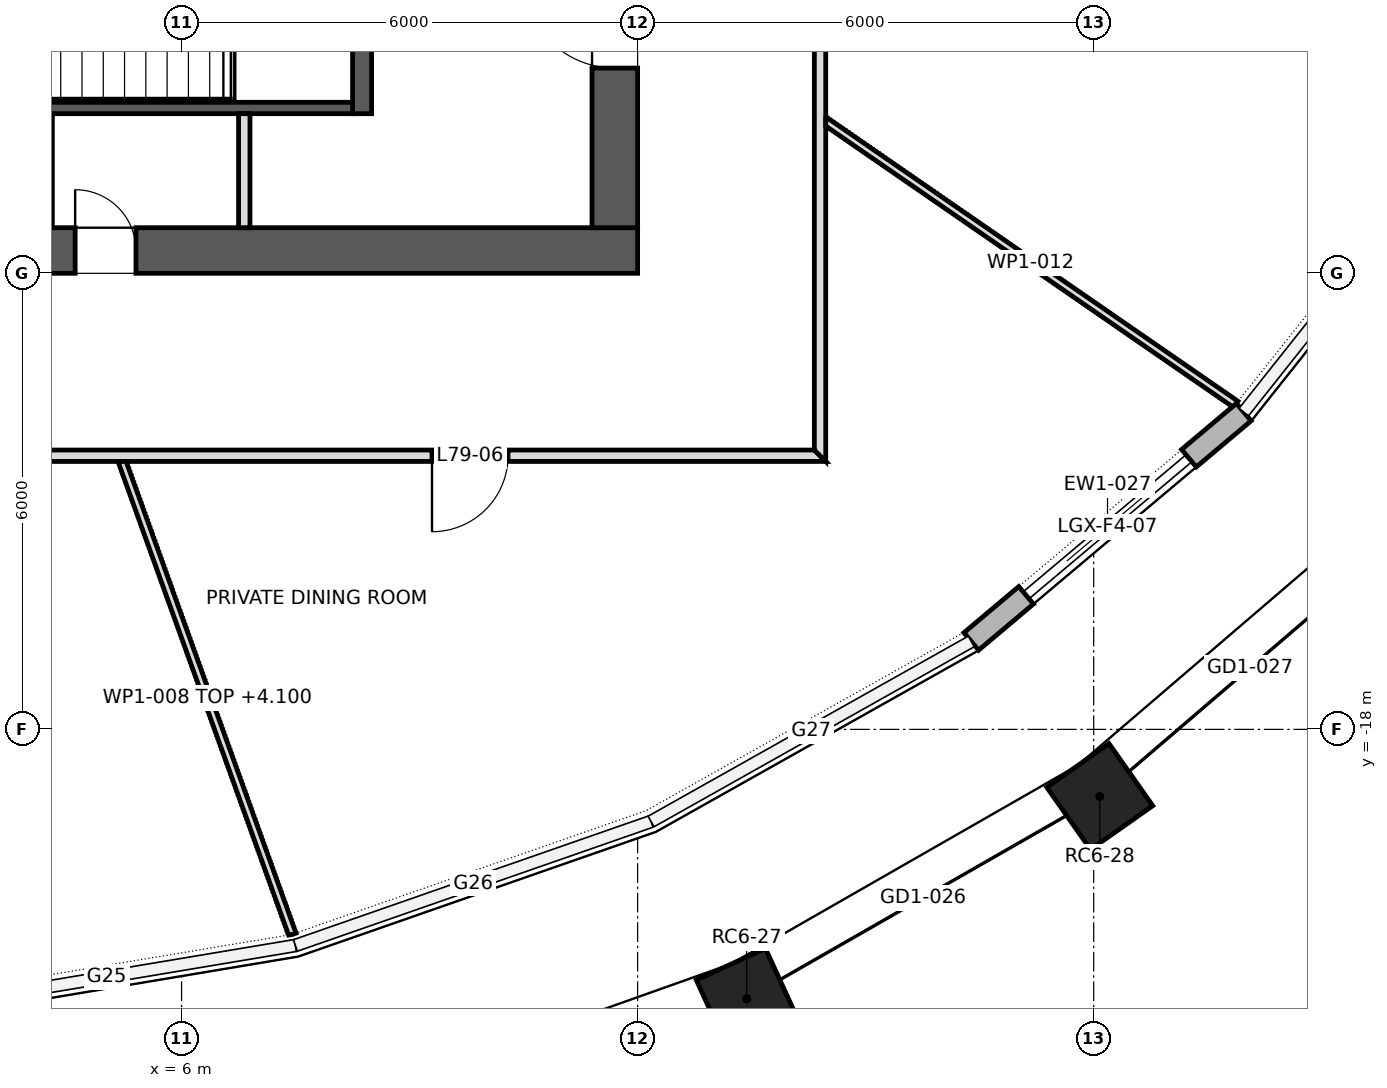
"""IFC4 building model, lengths in metres.
Left out: names, types, materials, properties, quantities, classifications, styles, units other than length and angle.
Written with IfcOpenShell. Run it as: python <this file> out.ifc"""

import sys

from ifc_helpers import new_model, si_unit, direction, frame, frame_2d, origin, origin_2d, place, context, subcontext, project, spatial, polyline, rectangle, outline, extrude, element, fill, save


model = new_model("IFC4")
c1 = context("Model", 3, precision=1e-05, world=origin(), true_north=direction((0.0, 1.0)))
c2 = subcontext(c1, "Body", "Model", "MODEL_VIEW")
j1 = project(units=[si_unit("LENGTHUNIT", "METRE"), si_unit("PLANEANGLEUNIT", "RADIAN")], contexts=[c1])
p1 = place(None, origin())
s1 = spatial("IfcSite", under=j1, at=p1, CompositionType="ELEMENT")
p2 = place(p1, origin())
s2 = spatial("IfcBuilding", under=s1, at=p2, CompositionType="ELEMENT")
p3 = place(p2, frame((0.0, 0.0, 338.3)))
s3 = spatial("IfcBuildingStorey", under=s2, at=p3, CompositionType="ELEMENT", Elevation=338.3)
for number, where, z_axis, x_axis in (
    (1, (13.435, -21.544, 0.0), (0.0, 0.0, 1.0), (0.909, 0.417, 0.0)),
    (2, (18.08, -18.884, 0.0), (0.0, 0.0, 1.0), (0.818, 0.575, 0.0)),
):
    element("IfcColumn", number, at=place(p3, frame(where, z_axis=z_axis, x_axis=x_axis)), inside=s3, PredefinedType="COLUMN", context=c2, shape_type="SweptSolid", body=[
        extrude(rectangle(XDim=1.0, YDim=1.0, at=origin_2d()), origin(), (0.0, 0.0, 1.0), 5.0),
    ])
p4 = place(p3, frame((-12.0, -11.7, 0.0), z_axis=(0.0, 0.0, 1.0), x_axis=(1.0, 0.0, 0.0)))
e3 = element("IfcWall", 3, at=p4, inside=s3, PredefinedType="SHEAR", context=c2, shape_type="SweptSolid", body=[
    extrude(rectangle(XDim=24.0, YDim=0.6, at=frame_2d((12.0, 0.0))), origin(), (0.0, 0.0, 1.0), 5.0),
])
p5 = place(p4, frame((9.975, 0.0, 0.0)))
e4 = element("IfcOpeningElement", 4, at=p5, cuts=e3, PredefinedType="OPENING", context=c2, shape_type="SweptSolid", body=[
    extrude(rectangle(XDim=0.9, YDim=2.1, at=frame_2d((0.45, 1.05))), frame((0.0, 0.312, 0.0), z_axis=(0.0, -1.0, 0.0), x_axis=(1.0, 0.0, 0.0)), (0.0, 0.0, 1.0), 0.624),
])
p6 = place(p4, frame((4.2, 0.0, 0.0)))
e5 = element("IfcOpeningElement", 5, at=p6, cuts=e3, PredefinedType="OPENING", context=c2, shape_type="SweptSolid", body=[
    extrude(rectangle(XDim=0.8, YDim=2.1, at=frame_2d((0.4, 1.05))), frame((0.0, 0.312, 0.0), z_axis=(0.0, -1.0, 0.0), x_axis=(1.0, 0.0, 0.0)), (0.0, 0.0, 1.0), 0.624),
])
p7 = place(p4, frame((13.8, 0.0, 0.0)))
e6 = element("IfcOpeningElement", 6, at=p7, cuts=e3, PredefinedType="OPENING", context=c2, shape_type="SweptSolid", body=[
    extrude(rectangle(XDim=0.8, YDim=2.1, at=frame_2d((0.4, 1.05))), frame((0.0, 0.312, 0.0), z_axis=(0.0, -1.0, 0.0), x_axis=(1.0, 0.0, 0.0)), (0.0, 0.0, 1.0), 0.624),
])
p8 = place(p4, frame((16.6, 0.0, 0.0)))
e7 = element("IfcOpeningElement", 7, at=p8, cuts=e3, PredefinedType="OPENING", context=c2, shape_type="SweptSolid", body=[
    extrude(rectangle(XDim=0.8, YDim=2.1, at=frame_2d((0.4, 1.05))), frame((0.0, 0.312, 0.0), z_axis=(0.0, -1.0, 0.0), x_axis=(1.0, 0.0, 0.0)), (0.0, 0.0, 1.0), 0.624),
])
p9 = place(p3, frame((11.7, -11.4, 0.0), z_axis=(0.0, 0.0, 1.0), x_axis=(0.0, 1.0, 0.0)))
e8 = element("IfcWall", 8, at=p9, inside=s3, PredefinedType="SHEAR", context=c2, shape_type="SweptSolid", body=[
    extrude(rectangle(XDim=22.8, YDim=0.6, at=frame_2d((11.4, 0.0))), origin(), (0.0, 0.0, 1.0), 5.0),
])
p10 = place(p9, frame((10.2, 0.0, 0.0)))
e9 = element("IfcOpeningElement", 9, at=p10, cuts=e8, PredefinedType="OPENING", context=c2, shape_type="SweptSolid", body=[
    extrude(rectangle(XDim=2.4, YDim=2.1, at=frame_2d((1.2, 1.05))), frame((0.0, 0.312, 0.0), z_axis=(0.0, -1.0, 0.0), x_axis=(1.0, 0.0, 0.0)), (0.0, 0.0, 1.0), 0.624),
])
p11 = place(p9, frame((19.5, 0.0, 0.0)))
e10 = element("IfcOpeningElement", 10, at=p11, cuts=e8, PredefinedType="OPENING", context=c2, shape_type="SweptSolid", body=[
    extrude(rectangle(XDim=1.2, YDim=2.1, at=frame_2d((0.6, 1.05))), frame((0.0, 0.312, 0.0), z_axis=(0.0, -1.0, 0.0), x_axis=(1.0, 0.0, 0.0)), (0.0, 0.0, 1.0), 0.624),
])
p12 = place(p9, frame((2.1, 0.0, 0.0)))
e11 = element("IfcOpeningElement", 11, at=p12, cuts=e8, PredefinedType="OPENING", context=c2, shape_type="SweptSolid", body=[
    extrude(rectangle(XDim=1.2, YDim=2.1, at=frame_2d((0.6, 1.05))), frame((0.0, 0.312, 0.0), z_axis=(0.0, -1.0, 0.0), x_axis=(1.0, 0.0, 0.0)), (0.0, 0.0, 1.0), 0.624),
])
p13 = place(p3, frame((16.39, -16.843, 0.0), z_axis=(0.0, 0.0, 1.0), x_axis=(0.765128700347, 0.643877373344, 0.0)))
e12 = element("IfcWall", 12, at=p13, inside=s3, PredefinedType="STANDARD", context=c2, shape_type="SweptSolid", body=[
    extrude(outline(polyline([(0.0, -0.15), (4.686, -0.15), (4.686, 0.15), (0.0, 0.15), (0.0, -0.15)])), origin(), (0.0, 0.0, 1.0), 4.65),
])
p14 = place(p13, frame((0.943, 0.0, 0.0)))
e13 = element("IfcOpeningElement", 13, at=p14, cuts=e12, PredefinedType="OPENING", context=c2, shape_type="SweptSolid", body=[
    extrude(rectangle(XDim=2.8, YDim=4.2, at=frame_2d((1.4, 2.1))), frame((0.0, 0.162, 0.0), z_axis=(0.0, -1.0, 0.0), x_axis=(1.0, 0.0, 0.0)), (0.0, 0.0, 1.0), 0.324),
])
p15 = place(p3, frame((8.375, -9.9, 0.0), z_axis=(0.0, 0.0, 1.0), x_axis=(0.0, 1.0, 0.0)))
e14 = element("IfcWall", 14, at=p15, inside=s3, PredefinedType="SHEAR", context=c2, shape_type="SweptSolid", body=[
    extrude(rectangle(XDim=3.4, YDim=0.25, at=frame_2d((1.7, 0.0))), origin(), (0.0, 0.0, 1.0), 4.65),
])
p16 = place(p15, frame((1.175, 0.0, 0.0)))
e15 = element("IfcOpeningElement", 15, at=p16, cuts=e14, PredefinedType="OPENING", context=c2, shape_type="SweptSolid", body=[
    extrude(rectangle(XDim=1.2, YDim=2.1, at=frame_2d((0.6, 1.05))), frame((0.0, 0.137, 0.0), z_axis=(0.0, -1.0, 0.0), x_axis=(1.0, 0.0, 0.0)), (0.0, 0.0, 1.0), 0.274),
])
p17 = place(p3, frame((0.25, -9.825, 0.0), z_axis=(0.0, 0.0, 1.0), x_axis=(1.0, 0.0, 0.0)))
e16 = element("IfcWall", 16, at=p17, inside=s3, PredefinedType="SHEAR", context=c2, shape_type="SweptSolid", body=[
    extrude(rectangle(XDim=8.0, YDim=0.15, at=frame_2d((4.0, 0.0))), origin(), (0.0, 0.0, 1.0), 4.65),
])
p18 = place(p3, frame((6.825, -11.4, 0.0), z_axis=(0.0, 0.0, 1.0), x_axis=(0.0, 1.0, 0.0)))
e17 = element("IfcWall", 17, at=p18, inside=s3, PredefinedType="PARTITIONING", context=c2, shape_type="SweptSolid", body=[
    extrude(rectangle(XDim=1.5, YDim=0.15, at=frame_2d((0.75, 0.0))), origin(), (0.0, 0.0, 1.0), 4.65),
])
p19 = place(p3, frame((-14.475, -14.4, 0.0), z_axis=(0.0, 0.0, 1.0), x_axis=(1.0, 0.0, 0.0)))
e18 = element("IfcWall", 18, at=p19, inside=s3, PredefinedType="PARTITIONING", context=c2, shape_type="SweptSolid", body=[
    extrude(outline(polyline([(0.0, -0.075), (1.93, -0.075), (3.86, -0.075), (5.79, -0.075), (7.72, -0.075), (9.65, -0.075), (11.58, -0.075), (13.51, -0.075), (15.44, -0.075), (17.37, -0.075), (19.3, -0.075), (21.23, -0.075), (23.16, -0.075), (25.09, -0.075), (27.02, -0.075), (28.95, -0.075), (28.8, 0.075), (26.89, 0.075), (24.98, 0.075), (23.07, 0.075), (21.16, 0.075), (19.25, 0.075), (17.34, 0.075), (15.43, 0.075), (13.52, 0.075), (11.61, 0.075), (9.7, 0.075), (7.79, 0.075), (5.88, 0.075), (3.97, 0.075), (2.06, 0.075), (0.15, 0.075), (0.0, -0.075)])), origin(), (0.0, 0.0, 1.0), 4.65),
])
p20 = place(p19, frame((4.36, 0.0, 0.0)))
e19 = element("IfcOpeningElement", 19, at=p20, cuts=e18, PredefinedType="OPENING", context=c2, shape_type="SweptSolid", body=[
    extrude(rectangle(XDim=1.0, YDim=2.1, at=frame_2d((0.5, 1.05))), frame((0.0, 0.087, 0.0), z_axis=(0.0, -1.0, 0.0), x_axis=(1.0, 0.0, 0.0)), (0.0, 0.0, 1.0), 0.174),
])
p21 = place(p19, frame((13.975, 0.0, 0.0)))
e20 = element("IfcOpeningElement", 20, at=p21, cuts=e18, PredefinedType="OPENING", context=c2, shape_type="SweptSolid", body=[
    extrude(rectangle(XDim=1.0, YDim=2.1, at=frame_2d((0.5, 1.05))), frame((0.0, 0.087, 0.0), z_axis=(0.0, -1.0, 0.0), x_axis=(1.0, 0.0, 0.0)), (0.0, 0.0, 1.0), 0.174),
])
p22 = place(p19, frame((23.77, 0.0, 0.0)))
e21 = element("IfcOpeningElement", 21, at=p22, cuts=e18, PredefinedType="OPENING", context=c2, shape_type="SweptSolid", body=[
    extrude(rectangle(XDim=1.0, YDim=2.1, at=frame_2d((0.5, 1.05))), frame((0.0, 0.087, 0.0), z_axis=(0.0, -1.0, 0.0), x_axis=(1.0, 0.0, 0.0)), (0.0, 0.0, 1.0), 0.174),
])
p23 = place(p3, frame((5.211, -14.458, 0.0), z_axis=(0.0, 0.0, 1.0), x_axis=(0.338886313763, -0.940827330781, 0.0)))
e22 = element("IfcWall", 22, at=p23, inside=s3, PredefinedType="PARTITIONING", context=c2, shape_type="SweptSolid", body=[
    extrude(outline(polyline([(0.0, -0.05), (1.656, -0.05), (3.311, -0.05), (4.967, -0.05), (6.623, -0.05), (6.632, 0.001), (6.632, 0.05), (4.983, 0.05), (3.334, 0.05), (1.685, 0.05), (0.036, 0.05), (0.0, -0.049), (0.0, -0.05)])), origin(), (0.0, 0.0, 1.0), 4.1),
])
p24 = place(p3, frame((14.4, -14.475, 0.0), z_axis=(0.0, 0.0, 1.0), x_axis=(0.0, 1.0, 0.0)))
e23 = element("IfcWall", 23, at=p24, inside=s3, PredefinedType="PARTITIONING", context=c2, shape_type="SweptSolid", body=[
    extrude(outline(polyline([(18.155, 0.075), (16.354, 0.075), (14.554, 0.075), (12.754, 0.075), (10.953, 0.075), (9.153, 0.075), (7.352, 0.075), (5.552, 0.075), (3.751, 0.075), (1.951, 0.075), (0.15, 0.075), (0.0, -0.075), (1.816, -0.075), (3.631, -0.075), (5.447, -0.075), (7.262, -0.075), (9.078, -0.075), (10.893, -0.075), (12.708, -0.075), (14.524, -0.075), (16.34, -0.075), (18.155, -0.075), (18.155, 0.075)])), origin(), (0.0, 0.0, 1.0), 4.65),
])
p25 = place(p24, frame((8.405, 0.0, 0.0)))
e24 = element("IfcOpeningElement", 24, at=p25, cuts=e23, PredefinedType="OPENING", context=c2, shape_type="SweptSolid", body=[
    extrude(rectangle(XDim=1.0, YDim=2.1, at=frame_2d((0.5, 1.05))), frame((0.0, 0.087, 0.0), z_axis=(0.0, -1.0, 0.0), x_axis=(1.0, 0.0, 0.0)), (0.0, 0.0, 1.0), 0.174),
])
p26 = place(p24, frame((15.22, 0.0, 0.0)))
e25 = element("IfcOpeningElement", 25, at=p26, cuts=e23, PredefinedType="OPENING", context=c2, shape_type="SweptSolid", body=[
    extrude(rectangle(XDim=1.0, YDim=2.1, at=frame_2d((0.5, 1.05))), frame((0.0, 0.087, 0.0), z_axis=(0.0, -1.0, 0.0), x_axis=(1.0, 0.0, 0.0)), (0.0, 0.0, 1.0), 0.174),
])
p27 = place(p3, frame((14.447, -9.982, 0.0), z_axis=(0.0, 0.0, 1.0), x_axis=(0.823077170229, -0.567929548314, 0.0)))
e26 = element("IfcWall", 26, at=p27, inside=s3, PredefinedType="PARTITIONING", context=c2, shape_type="SweptSolid", body=[
    extrude(outline(polyline([(0.069, -0.05), (1.694, -0.05), (3.319, -0.05), (4.945, -0.05), (6.57, -0.05), (6.584, 0.001), (6.587, 0.047), (6.587, 0.05), (4.94, 0.05), (3.293, 0.05), (1.647, 0.05), (0.0, 0.05), (0.0, 0.049), (0.069, -0.05)])), origin(), (0.0, 0.0, 1.0), 4.65),
])
p28 = place(p14, origin())
e27 = element("IfcDoor", 27, at=p28, inside=s3, OperationType="DOUBLE_DOOR_SLIDING", PredefinedType="DOOR", context=c2, shape_type="SweptSolid", body=[
    extrude(rectangle(XDim=2.8, YDim=4.2, at=frame_2d((1.4, 2.1))), frame((0.0, 0.025, 0.0), z_axis=(0.0, -1.0, 0.0), x_axis=(1.0, 0.0, 0.0)), (0.0, 0.0, 1.0), 0.05),
])
fill(e13, e27)
p29 = place(p12, origin())
e28 = element("IfcDoor", 28, at=p29, inside=s3, OperationType="SINGLE_SWING_LEFT", PredefinedType="DOOR", context=c2, shape_type="SweptSolid", body=[
    extrude(rectangle(XDim=1.2, YDim=2.1, at=frame_2d((0.6, 1.05))), frame((0.0, 0.025, 0.0), z_axis=(0.0, -1.0, 0.0), x_axis=(1.0, 0.0, 0.0)), (0.0, 0.0, 1.0), 0.05),
])
fill(e11, e28)
p30 = place(p8, origin())
e29 = element("IfcDoor", 29, at=p30, inside=s3, OperationType="SINGLE_SWING_RIGHT", PredefinedType="DOOR", context=c2, shape_type="SweptSolid", body=[
    extrude(rectangle(XDim=0.8, YDim=2.1, at=frame_2d((0.4, 1.05))), frame((0.0, 0.025, 0.0), z_axis=(0.0, -1.0, 0.0), x_axis=(1.0, 0.0, 0.0)), (0.0, 0.0, 1.0), 0.05),
])
fill(e7, e29)
p31 = place(p22, frame((1.0, 0.0, 0.0), z_axis=(0.0, 0.0, 1.0), x_axis=(-1.0, 0.0, 0.0)))
e30 = element("IfcDoor", 30, at=p31, inside=s3, OperationType="SINGLE_SWING_LEFT", PredefinedType="DOOR", context=c2, shape_type="SweptSolid", body=[
    extrude(rectangle(XDim=1.0, YDim=2.1, at=frame_2d((0.5, 1.05))), frame((0.0, 0.025, 0.0), z_axis=(0.0, -1.0, 0.0), x_axis=(1.0, 0.0, 0.0)), (0.0, 0.0, 1.0), 0.05),
])
fill(e21, e30)
save(model, sys.argv[1])
